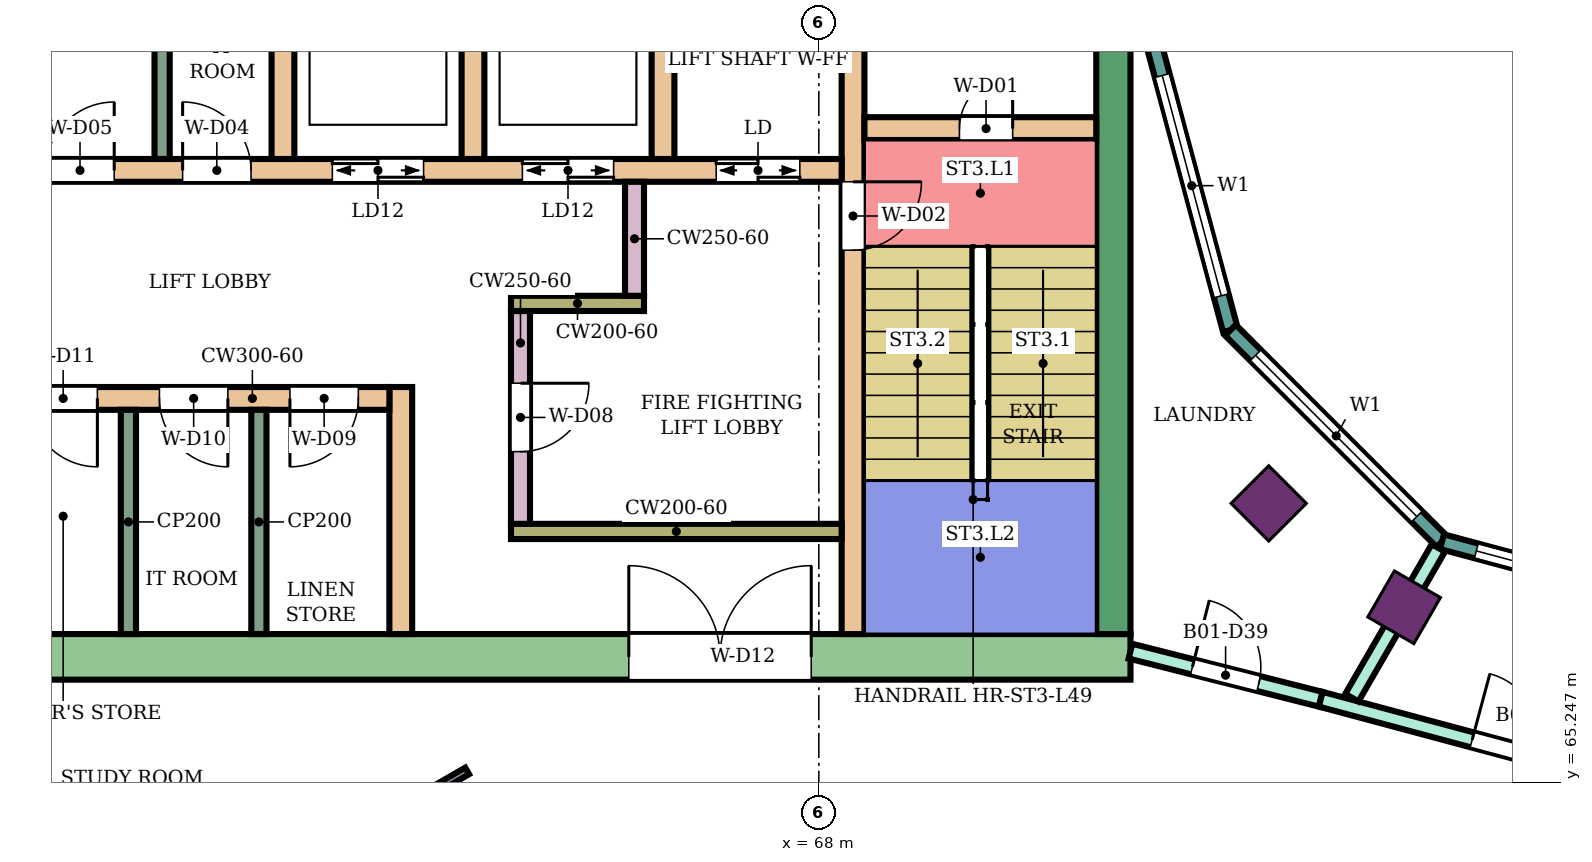
"""IFC4 building model, lengths in metres.
Left out: names, types, materials, properties, quantities, classifications, styles, units other than length and angle.
Written with IfcOpenShell. Run it as: python <this file> out.ifc"""

import sys

from ifc_helpers import new_model, si_unit, direction, frame, frame_2d, origin, origin_2d, place, context, subcontext, project, spatial, rectangle, extrude, element, fill, save


model = new_model("IFC4")
c1 = context("Model", 3, precision=1e-05, world=origin(), true_north=direction((0.0, 1.0)))
c2 = subcontext(c1, "Body", "Model", "MODEL_VIEW")
j1 = project(units=[si_unit("LENGTHUNIT", "METRE"), si_unit("PLANEANGLEUNIT", "RADIAN")], contexts=[c1])
p1 = place(None, origin())
s1 = spatial("IfcSite", under=j1, at=p1, CompositionType="ELEMENT")
p2 = place(p1, origin())
s2 = spatial("IfcBuilding", under=s1, at=p2, CompositionType="ELEMENT")
p3 = place(p2, frame((0.0, 0.0, 212.5)))
s3 = spatial("IfcBuildingStorey", under=s2, at=p3, CompositionType="ELEMENT", Elevation=212.5)
for number, where, z_axis, x_axis in (
    (1, (73.919, 68.919, 0.0), (0.0, 0.0, 1.0), (-0.707, -0.707, 0.0)),
    (2, (75.7, 67.552, 0.0), (0.0, 0.0, 1.0), (-0.5, -0.866, 0.0)),
):
    element("IfcColumn", number, at=place(p3, frame(where, z_axis=z_axis, x_axis=x_axis)), inside=s3, PredefinedType="COLUMN", context=c2, shape_type="SweptSolid", body=[
        extrude(rectangle(XDim=0.7, YDim=0.7, at=origin_2d()), origin(), (0.0, 0.0, 1.0), 4.2),
    ])
p4 = place(p3, frame((72.1, 66.9, 0.0), z_axis=(0.0, 0.0, 1.0), x_axis=(-1.0, 0.0, 0.0)))
e3 = element("IfcWall", 3, at=p4, inside=s3, PredefinedType="SHEAR", context=c2, shape_type="SweptSolid", body=[
    extrude(rectangle(XDim=14.9, YDim=0.6, at=frame_2d((7.45, 0.0))), origin(), (0.0, 0.0, 1.0), 3.88),
])
p5 = place(p4, frame((4.2, 0.0, 0.0)))
e4 = element("IfcOpeningElement", 4, at=p5, cuts=e3, PredefinedType="OPENING", context=c2, shape_type="SweptSolid", body=[
    extrude(rectangle(XDim=2.4, YDim=2.4, at=frame_2d((1.2, 1.2))), frame((0.0, 0.31, 0.0), z_axis=(0.0, -1.0, 0.0), x_axis=(1.0, 0.0, 0.0)), (0.0, 0.0, 1.0), 0.62),
])
p6 = place(p3, frame((71.875, 75.0, 0.0), z_axis=(0.0, 0.0, 1.0), x_axis=(0.0, -1.0, 0.0)))
e5 = element("IfcWall", 5, at=p6, inside=s3, PredefinedType="SHEAR", context=c2, shape_type="SweptSolid", body=[
    extrude(rectangle(XDim=7.8, YDim=0.45, at=frame_2d((3.9, 0.0))), origin(), (0.0, 0.0, 1.0), 3.88),
])
p7 = place(p3, frame((68.45, 75.0, 0.0), z_axis=(0.0, 0.0, 1.0), x_axis=(0.0, -1.0, 0.0)))
e6 = element("IfcWall", 6, at=p7, inside=s3, PredefinedType="SHEAR", context=c2, shape_type="SweptSolid", body=[
    extrude(rectangle(XDim=7.8, YDim=0.3, at=frame_2d((3.9, 0.0))), origin(), (0.0, 0.0, 1.0), 3.88),
])
p8 = place(p7, frame((1.85, 0.0, 0.0)))
e7 = element("IfcOpeningElement", 7, at=p8, cuts=e6, PredefinedType="OPENING", context=c2, shape_type="SweptSolid", body=[
    extrude(rectangle(XDim=0.9, YDim=2.1, at=frame_2d((0.45, 1.05))), frame((0.0, 0.16, 0.0), z_axis=(0.0, -1.0, 0.0), x_axis=(1.0, 0.0, 0.0)), (0.0, 0.0, 1.0), 0.32),
])
p9 = place(p3, frame((71.65, 73.85, 0.0), z_axis=(0.0, 0.0, 1.0), x_axis=(-1.0, 0.0, 0.0)))
e8 = element("IfcWall", 8, at=p9, inside=s3, PredefinedType="SHEAR", context=c2, shape_type="SweptSolid", body=[
    extrude(rectangle(XDim=3.05, YDim=0.3, at=frame_2d((1.525, 0.0))), origin(), (0.0, 0.0, 1.0), 3.88),
])
p10 = place(p9, frame((1.1, 0.0, 0.0)))
e9 = element("IfcOpeningElement", 9, at=p10, cuts=e8, PredefinedType="OPENING", context=c2, shape_type="SweptSolid", body=[
    extrude(rectangle(XDim=0.7, YDim=2.0, at=frame_2d((0.35, 1.0))), frame((0.0, 0.16, 0.0), z_axis=(0.0, -1.0, 0.0), x_axis=(1.0, 0.0, 0.0)), (0.0, 0.0, 1.0), 0.32),
])
p11 = place(p3, frame((68.3, 73.3, 0.0), z_axis=(0.0, 0.0, 1.0), x_axis=(-1.0, 0.0, 0.0)))
e10 = element("IfcWall", 10, at=p11, inside=s3, PredefinedType="SHEAR", context=c2, shape_type="SweptSolid", body=[
    extrude(rectangle(XDim=11.1, YDim=0.3, at=frame_2d((5.55, 0.0))), origin(), (0.0, 0.0, 1.0), 3.88),
])
p12 = place(p11, frame((0.55, 0.0, 0.0)))
e11 = element("IfcOpeningElement", 11, at=p12, cuts=e10, PredefinedType="OPENING", context=c2, shape_type="SweptSolid", body=[
    extrude(rectangle(XDim=1.1, YDim=2.1, at=frame_2d((0.55, 1.05))), frame((0.0, 0.16, 0.0), z_axis=(0.0, -1.0, 0.0), x_axis=(1.0, 0.0, 0.0)), (0.0, 0.0, 1.0), 0.32),
])
p13 = place(p11, frame((3.0, 0.0, 0.0)))
e12 = element("IfcOpeningElement", 12, at=p13, cuts=e10, PredefinedType="OPENING", context=c2, shape_type="SweptSolid", body=[
    extrude(rectangle(XDim=1.2, YDim=2.1, at=frame_2d((0.6, 1.05))), frame((0.0, 0.16, 0.0), z_axis=(0.0, -1.0, 0.0), x_axis=(1.0, 0.0, 0.0)), (0.0, 0.0, 1.0), 0.32),
])
p14 = place(p11, frame((5.5, 0.0, 0.0)))
e13 = element("IfcOpeningElement", 13, at=p14, cuts=e10, PredefinedType="OPENING", context=c2, shape_type="SweptSolid", body=[
    extrude(rectangle(XDim=1.2, YDim=2.1, at=frame_2d((0.6, 1.05))), frame((0.0, 0.16, 0.0), z_axis=(0.0, -1.0, 0.0), x_axis=(1.0, 0.0, 0.0)), (0.0, 0.0, 1.0), 0.32),
])
p15 = place(p11, frame((7.77, 0.0, 0.0)))
e14 = element("IfcOpeningElement", 14, at=p15, cuts=e10, PredefinedType="OPENING", context=c2, shape_type="SweptSolid", body=[
    extrude(rectangle(XDim=0.9, YDim=2.1, at=frame_2d((0.45, 1.05))), frame((0.0, 0.16, 0.0), z_axis=(0.0, -1.0, 0.0), x_axis=(1.0, 0.0, 0.0)), (0.0, 0.0, 1.0), 0.32),
])
p16 = place(p11, frame((9.57, 0.0, 0.0)))
e15 = element("IfcOpeningElement", 15, at=p16, cuts=e10, PredefinedType="OPENING", context=c2, shape_type="SweptSolid", body=[
    extrude(rectangle(XDim=0.9, YDim=2.1, at=frame_2d((0.45, 1.05))), frame((0.0, 0.16, 0.0), z_axis=(0.0, -1.0, 0.0), x_axis=(1.0, 0.0, 0.0)), (0.0, 0.0, 1.0), 0.32),
])
for number, where, z_axis, x_axis in (
    (16, (65.95, 76.0, 0.0), (0.0, 0.0, 1.0), (0.0, -1.0, 0.0)),
    (17, (63.45, 76.0, 0.0), (0.0, 0.0, 1.0), (0.0, -1.0, 0.0)),
    (18, (60.95, 76.0, 0.0), (0.0, 0.0, 1.0), (0.0, -1.0, 0.0)),
):
    element("IfcWall", number, at=place(p3, frame(where, z_axis=z_axis, x_axis=x_axis)), inside=s3, PredefinedType="SHEAR", context=c2, shape_type="SweptSolid", body=[
        extrude(rectangle(XDim=2.55, YDim=0.3, at=frame_2d((1.275, 0.0))), origin(), (0.0, 0.0, 1.0), 3.88),
    ])
p17 = place(p3, frame((68.3, 68.55, 0.0), z_axis=(0.0, 0.0, 1.0), x_axis=(-1.0, 0.0, 0.0)))
e19 = element("IfcWall", 19, at=p17, inside=s3, PredefinedType="SHEAR", context=c2, shape_type="SweptSolid", body=[
    extrude(rectangle(XDim=4.35, YDim=0.2, at=frame_2d((2.175, 0.0))), origin(), (0.0, 0.0, 1.0), 3.88),
])
p18 = place(p3, frame((64.075, 71.45, 0.0), z_axis=(0.0, 0.0, 1.0), x_axis=(0.0, -1.0, 0.0)))
e20 = element("IfcWall", 20, at=p18, inside=s3, PredefinedType="SHEAR", context=c2, shape_type="SweptSolid", body=[
    extrude(rectangle(XDim=2.8, YDim=0.25, at=frame_2d((1.4, 0.0))), origin(), (0.0, 0.0, 1.0), 3.88),
])
p19 = place(p18, frame((0.95, 0.0, 0.0)))
e21 = element("IfcOpeningElement", 21, at=p19, cuts=e20, PredefinedType="OPENING", context=c2, shape_type="SweptSolid", body=[
    extrude(rectangle(XDim=0.9, YDim=2.1, at=frame_2d((0.45, 1.05))), frame((0.0, 0.135, 0.0), z_axis=(0.0, -1.0, 0.0), x_axis=(1.0, 0.0, 0.0)), (0.0, 0.0, 1.0), 0.27),
])
p20 = place(p3, frame((65.7, 71.55, 0.0), z_axis=(0.0, 0.0, 1.0), x_axis=(-1.0, 0.0, 0.0)))
e22 = element("IfcWall", 22, at=p20, inside=s3, PredefinedType="SHEAR", context=c2, shape_type="SweptSolid", body=[
    extrude(rectangle(XDim=1.75, YDim=0.2, at=frame_2d((0.875, 0.0))), origin(), (0.0, 0.0, 1.0), 3.88),
])
p21 = place(p3, frame((65.575, 73.15, 0.0), z_axis=(0.0, 0.0, 1.0), x_axis=(0.0, -1.0, 0.0)))
e23 = element("IfcWall", 23, at=p21, inside=s3, PredefinedType="SHEAR", context=c2, shape_type="SweptSolid", body=[
    extrude(rectangle(XDim=1.5, YDim=0.25, at=frame_2d((0.75, 0.0))), origin(), (0.0, 0.0, 1.0), 3.88),
])
p22 = place(p3, frame((62.5, 70.45, 0.0), z_axis=(0.0, 0.0, 1.0), x_axis=(0.0, -1.0, 0.0)))
e24 = element("IfcWall", 24, at=p22, inside=s3, PredefinedType="SHEAR", context=c2, shape_type="SweptSolid", body=[
    extrude(rectangle(XDim=3.25, YDim=0.3, at=frame_2d((1.625, 0.0))), origin(), (0.0, 0.0, 1.0), 3.88),
])
p23 = place(p3, frame((62.35, 70.3, 0.0), z_axis=(0.0, 0.0, 1.0), x_axis=(-1.0, 0.0, 0.0)))
e25 = element("IfcWall", 25, at=p23, inside=s3, PredefinedType="SHEAR", context=c2, shape_type="SweptSolid", body=[
    extrude(rectangle(XDim=5.15, YDim=0.3, at=frame_2d((2.575, 0.0))), origin(), (0.0, 0.0, 1.0), 3.88),
])
p24 = place(p23, frame((0.408, 0.0, 0.0)))
e26 = element("IfcOpeningElement", 26, at=p24, cuts=e25, PredefinedType="OPENING", context=c2, shape_type="SweptSolid", body=[
    extrude(rectangle(XDim=0.9, YDim=2.1, at=frame_2d((0.45, 1.05))), frame((0.0, 0.16, 0.0), z_axis=(0.0, -1.0, 0.0), x_axis=(1.0, 0.0, 0.0)), (0.0, 0.0, 1.0), 0.32),
])
p25 = place(p23, frame((2.125, 0.0, 0.0)))
e27 = element("IfcOpeningElement", 27, at=p25, cuts=e25, PredefinedType="OPENING", context=c2, shape_type="SweptSolid", body=[
    extrude(rectangle(XDim=0.9, YDim=2.1, at=frame_2d((0.45, 1.05))), frame((0.0, 0.16, 0.0), z_axis=(0.0, -1.0, 0.0), x_axis=(1.0, 0.0, 0.0)), (0.0, 0.0, 1.0), 0.32),
])
p26 = place(p23, frame((3.842, 0.0, 0.0)))
e28 = element("IfcOpeningElement", 28, at=p26, cuts=e25, PredefinedType="OPENING", context=c2, shape_type="SweptSolid", body=[
    extrude(rectangle(XDim=0.9, YDim=2.1, at=frame_2d((0.45, 1.05))), frame((0.0, 0.16, 0.0), z_axis=(0.0, -1.0, 0.0), x_axis=(1.0, 0.0, 0.0)), (0.0, 0.0, 1.0), 0.32),
])
p27 = place(p3, frame((72.396, 75.0, 0.0), z_axis=(0.0, 0.0, 1.0), x_axis=(0.258789828301, -0.965933654434, 0.0)))
e29 = element("IfcWall", 29, at=p27, inside=s3, PredefinedType="NOTDEFINED", context=c2, shape_type="SweptSolid", body=[
    extrude(rectangle(XDim=3.936, YDim=0.2, at=frame_2d((1.968, 0.0))), origin(), (0.0, 0.0, 1.0), 4.2),
])
p28 = place(p27, frame((0.468, 0.0, 0.9)))
e30 = element("IfcOpeningElement", 30, at=p28, cuts=e29, PredefinedType="OPENING", context=c2, shape_type="SweptSolid", body=[
    extrude(rectangle(XDim=3.0, YDim=2.3, at=frame_2d((1.5, 1.15))), frame((0.0, 0.11, 0.0), z_axis=(0.0, -1.0, 0.0), x_axis=(1.0, 0.0, 0.0)), (0.0, 0.0, 1.0), 0.22),
])
p29 = place(p3, frame((73.415, 71.198, 0.0), z_axis=(0.0, 0.0, 1.0), x_axis=(0.707106781187, -0.707106781187, 0.0)))
e31 = element("IfcWall", 31, at=p29, inside=s3, PredefinedType="NOTDEFINED", context=c2, shape_type="SweptSolid", body=[
    extrude(rectangle(XDim=3.936, YDim=0.2, at=frame_2d((1.968, 0.0))), origin(), (0.0, 0.0, 1.0), 4.2),
])
p30 = place(p29, frame((0.468, 0.0, 0.9)))
e32 = element("IfcOpeningElement", 32, at=p30, cuts=e31, PredefinedType="OPENING", context=c2, shape_type="SweptSolid", body=[
    extrude(rectangle(XDim=3.0, YDim=2.3, at=frame_2d((1.5, 1.15))), frame((0.0, 0.11, 0.0), z_axis=(0.0, -1.0, 0.0), x_axis=(1.0, 0.0, 0.0)), (0.0, 0.0, 1.0), 0.22),
])
p31 = place(p3, frame((76.198, 68.415, 0.0), z_axis=(0.0, 0.0, 1.0), x_axis=(0.965933654434, -0.258789828301, 0.0)))
e33 = element("IfcWall", 33, at=p31, inside=s3, PredefinedType="NOTDEFINED", context=c2, shape_type="SweptSolid", body=[
    extrude(rectangle(XDim=3.936, YDim=0.2, at=frame_2d((1.968, 0.0))), origin(), (0.0, 0.0, 1.0), 4.2),
])
p32 = place(p31, frame((0.468, 0.0, 0.9)))
e34 = element("IfcOpeningElement", 34, at=p32, cuts=e33, PredefinedType="OPENING", context=c2, shape_type="SweptSolid", body=[
    extrude(rectangle(XDim=3.0, YDim=2.3, at=frame_2d((1.5, 1.15))), frame((0.0, 0.11, 0.0), z_axis=(0.0, -1.0, 0.0), x_axis=(1.0, 0.0, 0.0)), (0.0, 0.0, 1.0), 0.22),
])
p33 = place(p3, frame((72.1, 66.975, 0.0), z_axis=(0.0, 0.0, 1.0), x_axis=(0.969471314457, -0.245204752086, 0.0)))
e35 = element("IfcWall", 35, at=p33, inside=s3, PredefinedType="PARTITIONING", context=c2, shape_type="SweptSolid", body=[
    extrude(rectangle(XDim=2.582, YDim=0.2, at=frame_2d((1.291, 0.0))), origin(), (0.0, 0.0, 1.0), 3.75),
])
p34 = place(p33, frame((0.841, 0.0, 0.0)))
e36 = element("IfcOpeningElement", 36, at=p34, cuts=e35, PredefinedType="OPENING", context=c2, shape_type="SweptSolid", body=[
    extrude(rectangle(XDim=0.9, YDim=2.1, at=frame_2d((0.45, 1.05))), frame((0.0, 0.11, 0.0), z_axis=(0.0, -1.0, 0.0), x_axis=(1.0, 0.0, 0.0)), (0.0, 0.0, 1.0), 0.22),
])
p35 = place(p3, frame((74.603, 66.342, 0.0), z_axis=(0.0, 0.0, 1.0), x_axis=(0.965895298152, -0.258932950796, 0.0)))
e37 = element("IfcWall", 37, at=p35, inside=s3, PredefinedType="PARTITIONING", context=c2, shape_type="SweptSolid", body=[
    extrude(rectangle(XDim=5.538, YDim=0.2, at=frame_2d((2.769, 0.0))), origin(), (0.0, 0.0, 1.0), 3.75),
])
p36 = place(p35, frame((2.062, 0.0, 0.0)))
e38 = element("IfcOpeningElement", 38, at=p36, cuts=e37, PredefinedType="OPENING", context=c2, shape_type="SweptSolid", body=[
    extrude(rectangle(XDim=1.8, YDim=2.1, at=frame_2d((0.9, 1.05))), frame((0.0, 0.11, 0.0), z_axis=(0.0, -1.0, 0.0), x_axis=(1.0, 0.0, 0.0)), (0.0, 0.0, 1.0), 0.22),
])
p37 = place(p3, frame((75.013, 66.363, 0.0), z_axis=(0.0, 0.0, 1.0), x_axis=(0.500121996664, 0.86595495752, 0.0)))
e39 = element("IfcWall", 39, at=p37, inside=s3, PredefinedType="PARTITIONING", context=c2, shape_type="SweptSolid", body=[
    extrude(rectangle(XDim=2.274, YDim=0.2, at=frame_2d((1.137, 0.0))), origin(), (0.0, 0.0, 1.0), 3.75),
])
p38 = place(p3, frame((57.658, 62.102, 0.0), z_axis=(0.0, 0.0, 1.0), x_axis=(0.866131372301, 0.499816412211, 0.0)))
e40 = element("IfcWall", 40, at=p38, inside=s3, PredefinedType="PARTITIONING", context=c2, shape_type="SweptSolid", body=[
    extrude(rectangle(XDim=6.598, YDim=0.1, at=frame_2d((3.299, 0.0))), origin(), (0.0, 0.0, 1.0), 3.75),
])
p39 = place(p38, frame((1.77, 0.0, 0.0)))
e41 = element("IfcOpeningElement", 41, at=p39, cuts=e40, PredefinedType="OPENING", context=c2, shape_type="SweptSolid", body=[
    extrude(rectangle(XDim=0.9, YDim=2.1, at=frame_2d((0.45, 1.05))), frame((0.0, 0.06, 0.0), z_axis=(0.0, -1.0, 0.0), x_axis=(1.0, 0.0, 0.0)), (0.0, 0.0, 1.0), 0.12),
])
p40 = place(p3, frame((59.36, 76.0, 0.0), z_axis=(0.0, 0.0, 1.0), x_axis=(0.0, -1.0, 0.0)))
e42 = element("IfcWall", 42, at=p40, inside=s3, PredefinedType="PARTITIONING", context=c2, shape_type="SweptSolid", body=[
    extrude(rectangle(XDim=2.55, YDim=0.2, at=frame_2d((1.275, 0.0))), origin(), (0.0, 0.0, 1.0), 3.88),
])
for number, where, z_axis, x_axis in (
    (43, (60.633, 70.15, 0.0), (0.0, 0.0, 1.0), (0.0, -1.0, 0.0)),
    (44, (58.917, 70.15, 0.0), (0.0, 0.0, 1.0), (0.0, -1.0, 0.0)),
):
    element("IfcWall", number, at=place(p3, frame(where, z_axis=z_axis, x_axis=x_axis)), inside=s3, PredefinedType="PARTITIONING", context=c2, shape_type="SweptSolid", body=[
        extrude(rectangle(XDim=2.95, YDim=0.2, at=frame_2d((1.475, 0.0))), origin(), (0.0, 0.0, 1.0), 3.88),
    ])
p41 = place(p28, origin())
e45 = element("IfcWindow", 45, at=p41, inside=s3, PartitioningType="SINGLE_PANEL", PredefinedType="WINDOW", context=c2, shape_type="SweptSolid", body=[
    extrude(rectangle(XDim=3.0, YDim=2.3, at=frame_2d((1.5, 1.15))), frame((0.0, 0.03, 0.0), z_axis=(0.0, -1.0, 0.0), x_axis=(1.0, 0.0, 0.0)), (0.0, 0.0, 1.0), 0.06),
])
fill(e30, e45)
p42 = place(p30, origin())
e46 = element("IfcWindow", 46, at=p42, inside=s3, PartitioningType="SINGLE_PANEL", PredefinedType="WINDOW", context=c2, shape_type="SweptSolid", body=[
    extrude(rectangle(XDim=3.0, YDim=2.3, at=frame_2d((1.5, 1.15))), frame((0.0, 0.03, 0.0), z_axis=(0.0, -1.0, 0.0), x_axis=(1.0, 0.0, 0.0)), (0.0, 0.0, 1.0), 0.06),
])
fill(e32, e46)
p43 = place(p32, origin())
e47 = element("IfcWindow", 47, at=p43, inside=s3, PartitioningType="SINGLE_PANEL", PredefinedType="WINDOW", context=c2, shape_type="SweptSolid", body=[
    extrude(rectangle(XDim=3.0, YDim=2.3, at=frame_2d((1.5, 1.15))), frame((0.0, 0.03, 0.0), z_axis=(0.0, -1.0, 0.0), x_axis=(1.0, 0.0, 0.0)), (0.0, 0.0, 1.0), 0.06),
])
fill(e34, e47)
p44 = place(p36, origin())
e48 = element("IfcDoor", 48, at=p44, inside=s3, OperationType="DOUBLE_DOOR_SINGLE_SWING", PredefinedType="DOOR", context=c2, shape_type="SweptSolid", body=[
    extrude(rectangle(XDim=1.8, YDim=2.1, at=frame_2d((0.9, 1.05))), frame((0.0, 0.025, 0.0), z_axis=(0.0, -1.0, 0.0), x_axis=(1.0, 0.0, 0.0)), (0.0, 0.0, 1.0), 0.05),
])
fill(e38, e48)
p45 = place(p34, origin())
e49 = element("IfcDoor", 49, at=p45, inside=s3, OperationType="SINGLE_SWING_LEFT", PredefinedType="DOOR", context=c2, shape_type="SweptSolid", body=[
    extrude(rectangle(XDim=0.9, YDim=2.1, at=frame_2d((0.45, 1.05))), frame((0.0, 0.025, 0.0), z_axis=(0.0, -1.0, 0.0), x_axis=(1.0, 0.0, 0.0)), (0.0, 0.0, 1.0), 0.05),
])
fill(e36, e49)
p46 = place(p10, frame((0.7, 0.0, 0.0), z_axis=(0.0, 0.0, 1.0), x_axis=(-1.0, 0.0, 0.0)))
e50 = element("IfcDoor", 50, at=p46, inside=s3, OperationType="SINGLE_SWING_RIGHT", PredefinedType="DOOR", context=c2, shape_type="SweptSolid", body=[
    extrude(rectangle(XDim=0.7, YDim=2.0, at=frame_2d((0.35, 1.0))), frame((0.0, 0.025, 0.0), z_axis=(0.0, -1.0, 0.0), x_axis=(1.0, 0.0, 0.0)), (0.0, 0.0, 1.0), 0.05),
])
fill(e9, e50)
p47 = place(p8, origin())
e51 = element("IfcDoor", 51, at=p47, inside=s3, OperationType="SINGLE_SWING_LEFT", PredefinedType="DOOR", context=c2, shape_type="SweptSolid", body=[
    extrude(rectangle(XDim=0.9, YDim=2.1, at=frame_2d((0.45, 1.05))), frame((0.0, 0.025, 0.0), z_axis=(0.0, -1.0, 0.0), x_axis=(1.0, 0.0, 0.0)), (0.0, 0.0, 1.0), 0.05),
])
fill(e7, e51)
p48 = place(p12, origin())
e52 = element("IfcDoor", 52, at=p48, inside=s3, OperationType="DOUBLE_DOOR_SLIDING", PredefinedType="DOOR", context=c2, shape_type="SweptSolid", body=[
    extrude(rectangle(XDim=1.1, YDim=2.1, at=frame_2d((0.55, 1.05))), frame((0.0, 0.025, 0.0), z_axis=(0.0, -1.0, 0.0), x_axis=(1.0, 0.0, 0.0)), (0.0, 0.0, 1.0), 0.05),
])
fill(e11, e52)
p49 = place(p13, origin())
e53 = element("IfcDoor", 53, at=p49, inside=s3, OperationType="DOUBLE_DOOR_SLIDING", PredefinedType="DOOR", context=c2, shape_type="SweptSolid", body=[
    extrude(rectangle(XDim=1.2, YDim=2.1, at=frame_2d((0.6, 1.05))), frame((0.0, 0.025, 0.0), z_axis=(0.0, -1.0, 0.0), x_axis=(1.0, 0.0, 0.0)), (0.0, 0.0, 1.0), 0.05),
])
fill(e12, e53)
p50 = place(p14, origin())
e54 = element("IfcDoor", 54, at=p50, inside=s3, OperationType="DOUBLE_DOOR_SLIDING", PredefinedType="DOOR", context=c2, shape_type="SweptSolid", body=[
    extrude(rectangle(XDim=1.2, YDim=2.1, at=frame_2d((0.6, 1.05))), frame((0.0, 0.025, 0.0), z_axis=(0.0, -1.0, 0.0), x_axis=(1.0, 0.0, 0.0)), (0.0, 0.0, 1.0), 0.05),
])
fill(e13, e54)
p51 = place(p15, frame((0.9, 0.0, 0.0), z_axis=(0.0, 0.0, 1.0), x_axis=(-1.0, 0.0, 0.0)))
e55 = element("IfcDoor", 55, at=p51, inside=s3, OperationType="SINGLE_SWING_LEFT", PredefinedType="DOOR", context=c2, shape_type="SweptSolid", body=[
    extrude(rectangle(XDim=0.9, YDim=2.1, at=frame_2d((0.45, 1.05))), frame((0.0, 0.025, 0.0), z_axis=(0.0, -1.0, 0.0), x_axis=(1.0, 0.0, 0.0)), (0.0, 0.0, 1.0), 0.05),
])
fill(e14, e55)
p52 = place(p16, frame((0.9, 0.0, 0.0), z_axis=(0.0, 0.0, 1.0), x_axis=(-1.0, 0.0, 0.0)))
e56 = element("IfcDoor", 56, at=p52, inside=s3, OperationType="SINGLE_SWING_RIGHT", PredefinedType="DOOR", context=c2, shape_type="SweptSolid", body=[
    extrude(rectangle(XDim=0.9, YDim=2.1, at=frame_2d((0.45, 1.05))), frame((0.0, 0.025, 0.0), z_axis=(0.0, -1.0, 0.0), x_axis=(1.0, 0.0, 0.0)), (0.0, 0.0, 1.0), 0.05),
])
fill(e15, e56)
p53 = place(p19, origin())
e57 = element("IfcDoor", 57, at=p53, inside=s3, OperationType="SINGLE_SWING_LEFT", PredefinedType="DOOR", context=c2, shape_type="SweptSolid", body=[
    extrude(rectangle(XDim=0.9, YDim=2.1, at=frame_2d((0.45, 1.05))), frame((0.0, 0.025, 0.0), z_axis=(0.0, -1.0, 0.0), x_axis=(1.0, 0.0, 0.0)), (0.0, 0.0, 1.0), 0.05),
])
fill(e21, e57)
p54 = place(p24, origin())
e58 = element("IfcDoor", 58, at=p54, inside=s3, OperationType="SINGLE_SWING_RIGHT", PredefinedType="DOOR", context=c2, shape_type="SweptSolid", body=[
    extrude(rectangle(XDim=0.9, YDim=2.1, at=frame_2d((0.45, 1.05))), frame((0.0, 0.025, 0.0), z_axis=(0.0, -1.0, 0.0), x_axis=(1.0, 0.0, 0.0)), (0.0, 0.0, 1.0), 0.05),
])
fill(e26, e58)
p55 = place(p25, origin())
e59 = element("IfcDoor", 59, at=p55, inside=s3, OperationType="SINGLE_SWING_LEFT", PredefinedType="DOOR", context=c2, shape_type="SweptSolid", body=[
    extrude(rectangle(XDim=0.9, YDim=2.1, at=frame_2d((0.45, 1.05))), frame((0.0, 0.025, 0.0), z_axis=(0.0, -1.0, 0.0), x_axis=(1.0, 0.0, 0.0)), (0.0, 0.0, 1.0), 0.05),
])
fill(e27, e59)
p56 = place(p26, origin())
e60 = element("IfcDoor", 60, at=p56, inside=s3, OperationType="SINGLE_SWING_LEFT", PredefinedType="DOOR", context=c2, shape_type="SweptSolid", body=[
    extrude(rectangle(XDim=0.9, YDim=2.1, at=frame_2d((0.45, 1.05))), frame((0.0, 0.025, 0.0), z_axis=(0.0, -1.0, 0.0), x_axis=(1.0, 0.0, 0.0)), (0.0, 0.0, 1.0), 0.05),
])
fill(e28, e60)
p57 = place(p5, frame((2.4, 0.0, 0.0), z_axis=(0.0, 0.0, 1.0), x_axis=(-1.0, 0.0, 0.0)))
e61 = element("IfcDoor", 61, at=p57, inside=s3, OperationType="DOUBLE_DOOR_SINGLE_SWING", PredefinedType="DOOR", context=c2, shape_type="SweptSolid", body=[
    extrude(rectangle(XDim=2.4, YDim=2.4, at=frame_2d((1.2, 1.2))), frame((0.0, 0.025, 0.0), z_axis=(0.0, -1.0, 0.0), x_axis=(1.0, 0.0, 0.0)), (0.0, 0.0, 1.0), 0.05),
])
fill(e4, e61)
save(model, sys.argv[1])
